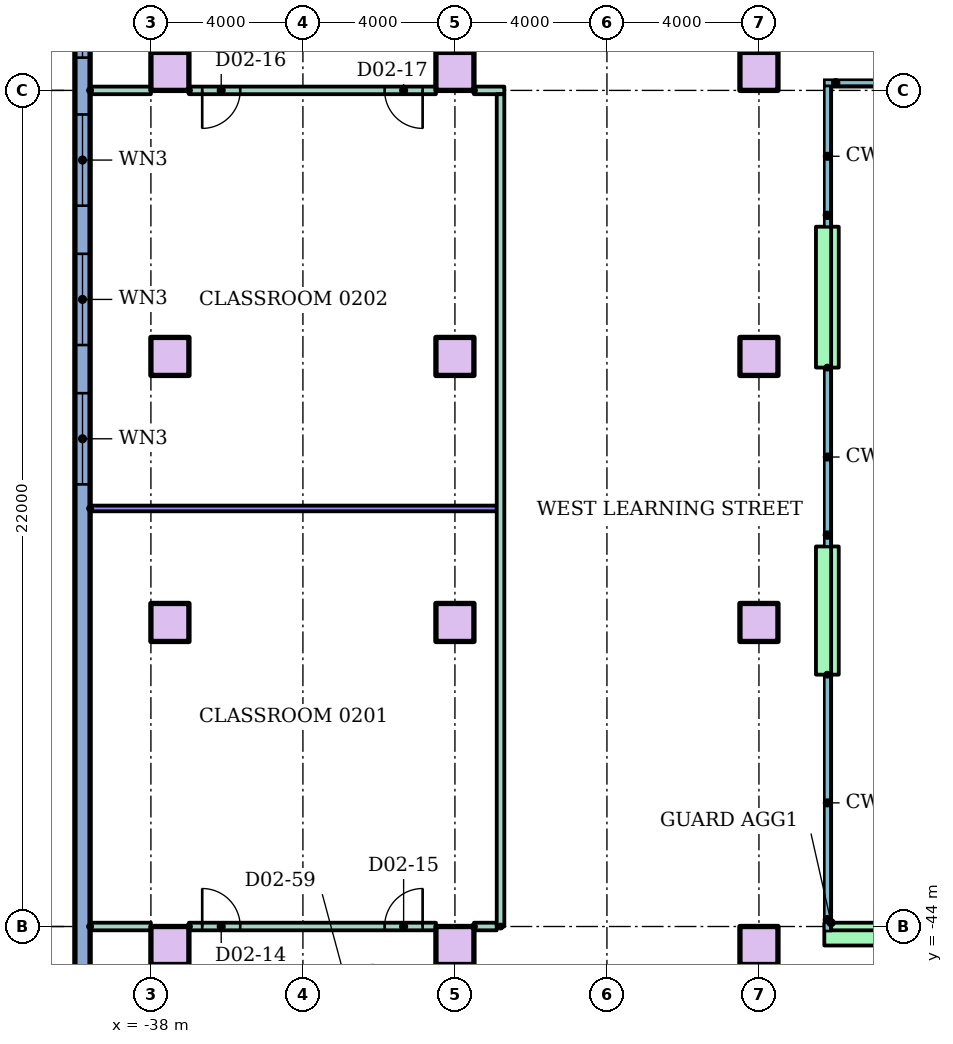
"""IFC4 building model, lengths in metres.
Left out: names, types, materials, properties, quantities, classifications, styles, units other than length and angle.
Written with IfcOpenShell. Run it as: python <this file> out.ifc"""

import sys

from ifc_helpers import new_model, si_unit, direction, frame, frame_2d, origin, origin_2d, place, context, subcontext, project, spatial, rectangle, extrude, element, fill, save


model = new_model("IFC4")
c1 = context("Model", 3, precision=1e-05, world=origin(), true_north=direction((0.0, 1.0)))
c2 = subcontext(c1, "Body", "Model", "MODEL_VIEW")
j1 = project(units=[si_unit("LENGTHUNIT", "METRE"), si_unit("PLANEANGLEUNIT", "RADIAN")], contexts=[c1])
p1 = place(None, origin())
s1 = spatial("IfcSite", under=j1, at=p1, CompositionType="ELEMENT")
p2 = place(p1, origin())
s2 = spatial("IfcBuilding", under=s1, at=p2, CompositionType="ELEMENT")
p3 = place(p2, frame((0.0, 0.0, 10.0)))
s3 = spatial("IfcBuildingStorey", under=s2, at=p3, CompositionType="ELEMENT", Elevation=10.0)
for number, where in (
    (1, (-37.5, -44.5, 0.0)),
    (2, (-30.0, -44.5, 0.0)),
    (3, (-22.0, -44.5, 0.0)),
    (4, (-37.5, -36.0, 0.0)),
    (5, (-30.0, -36.0, 0.0)),
    (6, (-22.0, -36.0, 0.0)),
    (7, (-37.5, -29.0, 0.0)),
    (8, (-30.0, -29.0, 0.0)),
    (9, (-22.0, -29.0, 0.0)),
    (10, (-37.5, -21.5, 0.0)),
    (11, (-30.0, -21.5, 0.0)),
    (12, (-22.0, -21.5, 0.0)),
):
    element("IfcColumn", number, at=place(p3, frame(where)), inside=s3, PredefinedType="COLUMN", context=c2, shape_type="SweptSolid", body=[
        extrude(rectangle(XDim=1.0, YDim=1.0, at=origin_2d()), origin(), (0.0, 0.0, 1.0), 4.0),
    ])
p4 = place(p3, frame((-39.8, 20.0, 0.0), z_axis=(0.0, 0.0, 1.0), x_axis=(0.0, -1.0, 0.0)))
e13 = element("IfcWall", 13, at=p4, inside=s3, PredefinedType="STANDARD", context=c2, shape_type="SweptSolid", body=[
    extrude(rectangle(XDim=70.0, YDim=0.4, at=frame_2d((35.0, 0.0))), origin(), (0.0, 0.0, 1.0), 3.7),
])
p5 = place(p4, frame((1.05, 0.0, 0.9)))
e14 = element("IfcOpeningElement", 14, at=p5, cuts=e13, PredefinedType="OPENING", context=c2, shape_type="SweptSolid", body=[
    extrude(rectangle(XDim=2.4, YDim=2.1, at=frame_2d((1.2, 1.05))), frame((0.0, 0.21, 0.0), z_axis=(0.0, -1.0, 0.0), x_axis=(1.0, 0.0, 0.0)), (0.0, 0.0, 1.0), 0.42),
])
p6 = place(p4, frame((5.55, 0.0, 0.9)))
e15 = element("IfcOpeningElement", 15, at=p6, cuts=e13, PredefinedType="OPENING", context=c2, shape_type="SweptSolid", body=[
    extrude(rectangle(XDim=2.4, YDim=2.1, at=frame_2d((1.2, 1.05))), frame((0.0, 0.21, 0.0), z_axis=(0.0, -1.0, 0.0), x_axis=(1.0, 0.0, 0.0)), (0.0, 0.0, 1.0), 0.42),
])
p7 = place(p4, frame((9.863, 0.0, 0.9)))
e16 = element("IfcOpeningElement", 16, at=p7, cuts=e13, PredefinedType="OPENING", context=c2, shape_type="SweptSolid", body=[
    extrude(rectangle(XDim=2.4, YDim=2.1, at=frame_2d((1.2, 1.05))), frame((0.0, 0.21, 0.0), z_axis=(0.0, -1.0, 0.0), x_axis=(1.0, 0.0, 0.0)), (0.0, 0.0, 1.0), 0.42),
])
p8 = place(p4, frame((13.988, 0.0, 0.9)))
e17 = element("IfcOpeningElement", 17, at=p8, cuts=e13, PredefinedType="OPENING", context=c2, shape_type="SweptSolid", body=[
    extrude(rectangle(XDim=2.4, YDim=2.1, at=frame_2d((1.2, 1.05))), frame((0.0, 0.21, 0.0), z_axis=(0.0, -1.0, 0.0), x_axis=(1.0, 0.0, 0.0)), (0.0, 0.0, 1.0), 0.42),
])
p9 = place(p4, frame((18.113, 0.0, 0.9)))
e18 = element("IfcOpeningElement", 18, at=p9, cuts=e13, PredefinedType="OPENING", context=c2, shape_type="SweptSolid", body=[
    extrude(rectangle(XDim=2.4, YDim=2.1, at=frame_2d((1.2, 1.05))), frame((0.0, 0.21, 0.0), z_axis=(0.0, -1.0, 0.0), x_axis=(1.0, 0.0, 0.0)), (0.0, 0.0, 1.0), 0.42),
])
p10 = place(p4, frame((22.238, 0.0, 0.9)))
e19 = element("IfcOpeningElement", 19, at=p10, cuts=e13, PredefinedType="OPENING", context=c2, shape_type="SweptSolid", body=[
    extrude(rectangle(XDim=2.4, YDim=2.1, at=frame_2d((1.2, 1.05))), frame((0.0, 0.21, 0.0), z_axis=(0.0, -1.0, 0.0), x_axis=(1.0, 0.0, 0.0)), (0.0, 0.0, 1.0), 0.42),
])
p11 = place(p4, frame((26.363, 0.0, 0.9)))
e20 = element("IfcOpeningElement", 20, at=p11, cuts=e13, PredefinedType="OPENING", context=c2, shape_type="SweptSolid", body=[
    extrude(rectangle(XDim=2.4, YDim=2.1, at=frame_2d((1.2, 1.05))), frame((0.0, 0.21, 0.0), z_axis=(0.0, -1.0, 0.0), x_axis=(1.0, 0.0, 0.0)), (0.0, 0.0, 1.0), 0.42),
])
p12 = place(p4, frame((30.488, 0.0, 0.9)))
e21 = element("IfcOpeningElement", 21, at=p12, cuts=e13, PredefinedType="OPENING", context=c2, shape_type="SweptSolid", body=[
    extrude(rectangle(XDim=2.4, YDim=2.1, at=frame_2d((1.2, 1.05))), frame((0.0, 0.21, 0.0), z_axis=(0.0, -1.0, 0.0), x_axis=(1.0, 0.0, 0.0)), (0.0, 0.0, 1.0), 0.42),
])
p13 = place(p4, frame((34.613, 0.0, 0.9)))
e22 = element("IfcOpeningElement", 22, at=p13, cuts=e13, PredefinedType="OPENING", context=c2, shape_type="SweptSolid", body=[
    extrude(rectangle(XDim=2.4, YDim=2.1, at=frame_2d((1.2, 1.05))), frame((0.0, 0.21, 0.0), z_axis=(0.0, -1.0, 0.0), x_axis=(1.0, 0.0, 0.0)), (0.0, 0.0, 1.0), 0.42),
])
p14 = place(p4, frame((38.738, 0.0, 0.9)))
e23 = element("IfcOpeningElement", 23, at=p14, cuts=e13, PredefinedType="OPENING", context=c2, shape_type="SweptSolid", body=[
    extrude(rectangle(XDim=2.4, YDim=2.1, at=frame_2d((1.2, 1.05))), frame((0.0, 0.21, 0.0), z_axis=(0.0, -1.0, 0.0), x_axis=(1.0, 0.0, 0.0)), (0.0, 0.0, 1.0), 0.42),
])
p15 = place(p4, frame((42.633, 0.0, 0.9)))
e24 = element("IfcOpeningElement", 24, at=p15, cuts=e13, PredefinedType="OPENING", context=c2, shape_type="SweptSolid", body=[
    extrude(rectangle(XDim=2.4, YDim=2.1, at=frame_2d((1.2, 1.05))), frame((0.0, 0.21, 0.0), z_axis=(0.0, -1.0, 0.0), x_axis=(1.0, 0.0, 0.0)), (0.0, 0.0, 1.0), 0.42),
])
p16 = place(p4, frame((46.3, 0.0, 0.9)))
e25 = element("IfcOpeningElement", 25, at=p16, cuts=e13, PredefinedType="OPENING", context=c2, shape_type="SweptSolid", body=[
    extrude(rectangle(XDim=2.4, YDim=2.1, at=frame_2d((1.2, 1.05))), frame((0.0, 0.21, 0.0), z_axis=(0.0, -1.0, 0.0), x_axis=(1.0, 0.0, 0.0)), (0.0, 0.0, 1.0), 0.42),
])
p17 = place(p4, frame((49.967, 0.0, 0.9)))
e26 = element("IfcOpeningElement", 26, at=p17, cuts=e13, PredefinedType="OPENING", context=c2, shape_type="SweptSolid", body=[
    extrude(rectangle(XDim=2.4, YDim=2.1, at=frame_2d((1.2, 1.05))), frame((0.0, 0.21, 0.0), z_axis=(0.0, -1.0, 0.0), x_axis=(1.0, 0.0, 0.0)), (0.0, 0.0, 1.0), 0.42),
])
p18 = place(p4, frame((66.85, 0.0, 0.9)))
e27 = element("IfcOpeningElement", 27, at=p18, cuts=e13, PredefinedType="OPENING", context=c2, shape_type="SweptSolid", body=[
    extrude(rectangle(XDim=2.4, YDim=2.1, at=frame_2d((1.2, 1.05))), frame((0.0, 0.21, 0.0), z_axis=(0.0, -1.0, 0.0), x_axis=(1.0, 0.0, 0.0)), (0.0, 0.0, 1.0), 0.42),
])
p19 = place(p3, frame((-18.0, -44.2, 0.0), z_axis=(0.0, 0.0, 1.0), x_axis=(-1.0, 0.0, 0.0)))
e28 = element("IfcWall", 28, at=p19, inside=s3, PredefinedType="STANDARD", context=c2, shape_type="SweptSolid", body=[
    extrude(rectangle(XDim=2.28, YDim=0.6, at=frame_2d((1.14, 0.0))), origin(), (0.0, 0.0, 1.0), 3.7),
])
p20 = place(p3, frame((-20.2, -37.373, 0.0), z_axis=(0.0, 0.0, 1.0), x_axis=(0.0, 1.0, 0.0)))
e29 = element("IfcWall", 29, at=p20, inside=s3, PredefinedType="STANDARD", context=c2, shape_type="SweptSolid", body=[
    extrude(rectangle(XDim=3.373, YDim=0.6, at=frame_2d((1.687, 0.0))), origin(), (0.0, 0.0, 1.0), 3.7),
])
p21 = place(p3, frame((-20.2, -29.293, 0.0), z_axis=(0.0, 0.0, 1.0), x_axis=(0.0, 1.0, 0.0)))
e30 = element("IfcWall", 30, at=p21, inside=s3, PredefinedType="STANDARD", context=c2, shape_type="SweptSolid", body=[
    extrude(rectangle(XDim=3.707, YDim=0.6, at=frame_2d((1.853, 0.0))), origin(), (0.0, 0.0, 1.0), 3.7),
])
p22 = place(p3, frame((-39.6, -44.0, 0.0)))
e31 = element("IfcWall", 31, at=p22, inside=s3, PredefinedType="PARTITIONING", context=c2, shape_type="SweptSolid", body=[
    extrude(rectangle(XDim=1.6, YDim=0.2, at=frame_2d((0.8, 0.0))), origin(), (0.0, 0.0, 1.0), 3.7),
])
p23 = place(p3, frame((-37.0, -44.0, 0.0)))
e32 = element("IfcWall", 32, at=p23, inside=s3, PredefinedType="PARTITIONING", context=c2, shape_type="SweptSolid", body=[
    extrude(rectangle(XDim=6.5, YDim=0.2, at=frame_2d((3.25, 0.0))), origin(), (0.0, 0.0, 1.0), 3.7),
])
p24 = place(p23, frame((0.35, 0.0, 0.0)))
e33 = element("IfcOpeningElement", 33, at=p24, cuts=e32, PredefinedType="OPENING", context=c2, shape_type="SweptSolid", body=[
    extrude(rectangle(XDim=1.0, YDim=2.1, at=frame_2d((0.5, 1.05))), frame((0.0, 0.11, 0.0), z_axis=(0.0, -1.0, 0.0), x_axis=(1.0, 0.0, 0.0)), (0.0, 0.0, 1.0), 0.22),
])
p25 = place(p23, frame((5.15, 0.0, 0.0)))
e34 = element("IfcOpeningElement", 34, at=p25, cuts=e32, PredefinedType="OPENING", context=c2, shape_type="SweptSolid", body=[
    extrude(rectangle(XDim=1.0, YDim=2.1, at=frame_2d((0.5, 1.05))), frame((0.0, 0.11, 0.0), z_axis=(0.0, -1.0, 0.0), x_axis=(1.0, 0.0, 0.0)), (0.0, 0.0, 1.0), 0.22),
])
p26 = place(p3, frame((-29.5, -44.0, 0.0)))
e35 = element("IfcWall", 35, at=p26, inside=s3, PredefinedType="PARTITIONING", context=c2, shape_type="SweptSolid", body=[
    extrude(rectangle(XDim=0.6, YDim=0.2, at=frame_2d((0.3, 0.0))), origin(), (0.0, 0.0, 1.0), 3.7),
])
p27 = place(p3, frame((-39.6, -33.0, 0.0)))
e36 = element("IfcWall", 36, at=p27, inside=s3, PredefinedType="PARTITIONING", context=c2, shape_type="SweptSolid", body=[
    extrude(rectangle(XDim=10.7, YDim=0.15, at=frame_2d((5.35, 0.0))), origin(), (0.0, 0.0, 1.0), 3.7),
])
p28 = place(p3, frame((-39.6, -22.0, 0.0)))
e37 = element("IfcWall", 37, at=p28, inside=s3, PredefinedType="PARTITIONING", context=c2, shape_type="SweptSolid", body=[
    extrude(rectangle(XDim=1.6, YDim=0.2, at=frame_2d((0.8, 0.0))), origin(), (0.0, 0.0, 1.0), 3.7),
])
p29 = place(p3, frame((-37.0, -22.0, 0.0)))
e38 = element("IfcWall", 38, at=p29, inside=s3, PredefinedType="PARTITIONING", context=c2, shape_type="SweptSolid", body=[
    extrude(rectangle(XDim=6.5, YDim=0.2, at=frame_2d((3.25, 0.0))), origin(), (0.0, 0.0, 1.0), 3.7),
])
p30 = place(p29, frame((0.35, 0.0, 0.0)))
e39 = element("IfcOpeningElement", 39, at=p30, cuts=e38, PredefinedType="OPENING", context=c2, shape_type="SweptSolid", body=[
    extrude(rectangle(XDim=1.0, YDim=2.1, at=frame_2d((0.5, 1.05))), frame((0.0, 0.11, 0.0), z_axis=(0.0, -1.0, 0.0), x_axis=(1.0, 0.0, 0.0)), (0.0, 0.0, 1.0), 0.22),
])
p31 = place(p29, frame((5.15, 0.0, 0.0)))
e40 = element("IfcOpeningElement", 40, at=p31, cuts=e38, PredefinedType="OPENING", context=c2, shape_type="SweptSolid", body=[
    extrude(rectangle(XDim=1.0, YDim=2.1, at=frame_2d((0.5, 1.05))), frame((0.0, 0.11, 0.0), z_axis=(0.0, -1.0, 0.0), x_axis=(1.0, 0.0, 0.0)), (0.0, 0.0, 1.0), 0.22),
])
p32 = place(p3, frame((-29.5, -22.0, 0.0)))
e41 = element("IfcWall", 41, at=p32, inside=s3, PredefinedType="PARTITIONING", context=c2, shape_type="SweptSolid", body=[
    extrude(rectangle(XDim=0.8, YDim=0.2, at=frame_2d((0.4, 0.0))), origin(), (0.0, 0.0, 1.0), 3.7),
])
p33 = place(p3, frame((-28.8, -44.0, 0.0), z_axis=(0.0, 0.0, 1.0), x_axis=(0.0, 1.0, 0.0)))
e42 = element("IfcWall", 42, at=p33, inside=s3, PredefinedType="PARTITIONING", context=c2, shape_type="SweptSolid", body=[
    extrude(rectangle(XDim=21.9, YDim=0.2, at=frame_2d((10.95, 0.0))), origin(), (0.0, 0.0, 1.0), 3.7),
])
p34 = place(p14, origin())
e43 = element("IfcWindow", 43, at=p34, inside=s3, PartitioningType="SINGLE_PANEL", PredefinedType="WINDOW", context=c2, shape_type="SweptSolid", body=[
    extrude(rectangle(XDim=2.4, YDim=2.1, at=frame_2d((1.2, 1.05))), frame((0.0, 0.03, 0.0), z_axis=(0.0, -1.0, 0.0), x_axis=(1.0, 0.0, 0.0)), (0.0, 0.0, 1.0), 0.06),
])
fill(e23, e43)
p35 = place(p15, origin())
e44 = element("IfcWindow", 44, at=p35, inside=s3, PartitioningType="SINGLE_PANEL", PredefinedType="WINDOW", context=c2, shape_type="SweptSolid", body=[
    extrude(rectangle(XDim=2.4, YDim=2.1, at=frame_2d((1.2, 1.05))), frame((0.0, 0.03, 0.0), z_axis=(0.0, -1.0, 0.0), x_axis=(1.0, 0.0, 0.0)), (0.0, 0.0, 1.0), 0.06),
])
fill(e24, e44)
p36 = place(p16, origin())
e45 = element("IfcWindow", 45, at=p36, inside=s3, PartitioningType="SINGLE_PANEL", PredefinedType="WINDOW", context=c2, shape_type="SweptSolid", body=[
    extrude(rectangle(XDim=2.4, YDim=2.1, at=frame_2d((1.2, 1.05))), frame((0.0, 0.03, 0.0), z_axis=(0.0, -1.0, 0.0), x_axis=(1.0, 0.0, 0.0)), (0.0, 0.0, 1.0), 0.06),
])
fill(e25, e45)
p37 = place(p17, origin())
e46 = element("IfcWindow", 46, at=p37, inside=s3, PartitioningType="SINGLE_PANEL", PredefinedType="WINDOW", context=c2, shape_type="SweptSolid", body=[
    extrude(rectangle(XDim=2.4, YDim=2.1, at=frame_2d((1.2, 1.05))), frame((0.0, 0.03, 0.0), z_axis=(0.0, -1.0, 0.0), x_axis=(1.0, 0.0, 0.0)), (0.0, 0.0, 1.0), 0.06),
])
fill(e26, e46)
p38 = place(p24, origin())
e47 = element("IfcDoor", 47, at=p38, inside=s3, OperationType="SINGLE_SWING_LEFT", PredefinedType="DOOR", context=c2, shape_type="SweptSolid", body=[
    extrude(rectangle(XDim=1.0, YDim=2.1, at=frame_2d((0.5, 1.05))), frame((0.0, 0.025, 0.0), z_axis=(0.0, -1.0, 0.0), x_axis=(1.0, 0.0, 0.0)), (0.0, 0.0, 1.0), 0.05),
])
fill(e33, e47)
p39 = place(p25, origin())
e48 = element("IfcDoor", 48, at=p39, inside=s3, OperationType="SINGLE_SWING_RIGHT", PredefinedType="DOOR", context=c2, shape_type="SweptSolid", body=[
    extrude(rectangle(XDim=1.0, YDim=2.1, at=frame_2d((0.5, 1.05))), frame((0.0, 0.025, 0.0), z_axis=(0.0, -1.0, 0.0), x_axis=(1.0, 0.0, 0.0)), (0.0, 0.0, 1.0), 0.05),
])
fill(e34, e48)
p40 = place(p30, frame((1.0, 0.0, 0.0), z_axis=(0.0, 0.0, 1.0), x_axis=(-1.0, 0.0, 0.0)))
e49 = element("IfcDoor", 49, at=p40, inside=s3, OperationType="SINGLE_SWING_LEFT", PredefinedType="DOOR", context=c2, shape_type="SweptSolid", body=[
    extrude(rectangle(XDim=1.0, YDim=2.1, at=frame_2d((0.5, 1.05))), frame((0.0, 0.025, 0.0), z_axis=(0.0, -1.0, 0.0), x_axis=(1.0, 0.0, 0.0)), (0.0, 0.0, 1.0), 0.05),
])
fill(e39, e49)
p41 = place(p31, frame((1.0, 0.0, 0.0), z_axis=(0.0, 0.0, 1.0), x_axis=(-1.0, 0.0, 0.0)))
e50 = element("IfcDoor", 50, at=p41, inside=s3, OperationType="SINGLE_SWING_RIGHT", PredefinedType="DOOR", context=c2, shape_type="SweptSolid", body=[
    extrude(rectangle(XDim=1.0, YDim=2.1, at=frame_2d((0.5, 1.05))), frame((0.0, 0.025, 0.0), z_axis=(0.0, -1.0, 0.0), x_axis=(1.0, 0.0, 0.0)), (0.0, 0.0, 1.0), 0.05),
])
fill(e40, e50)
save(model, sys.argv[1])
